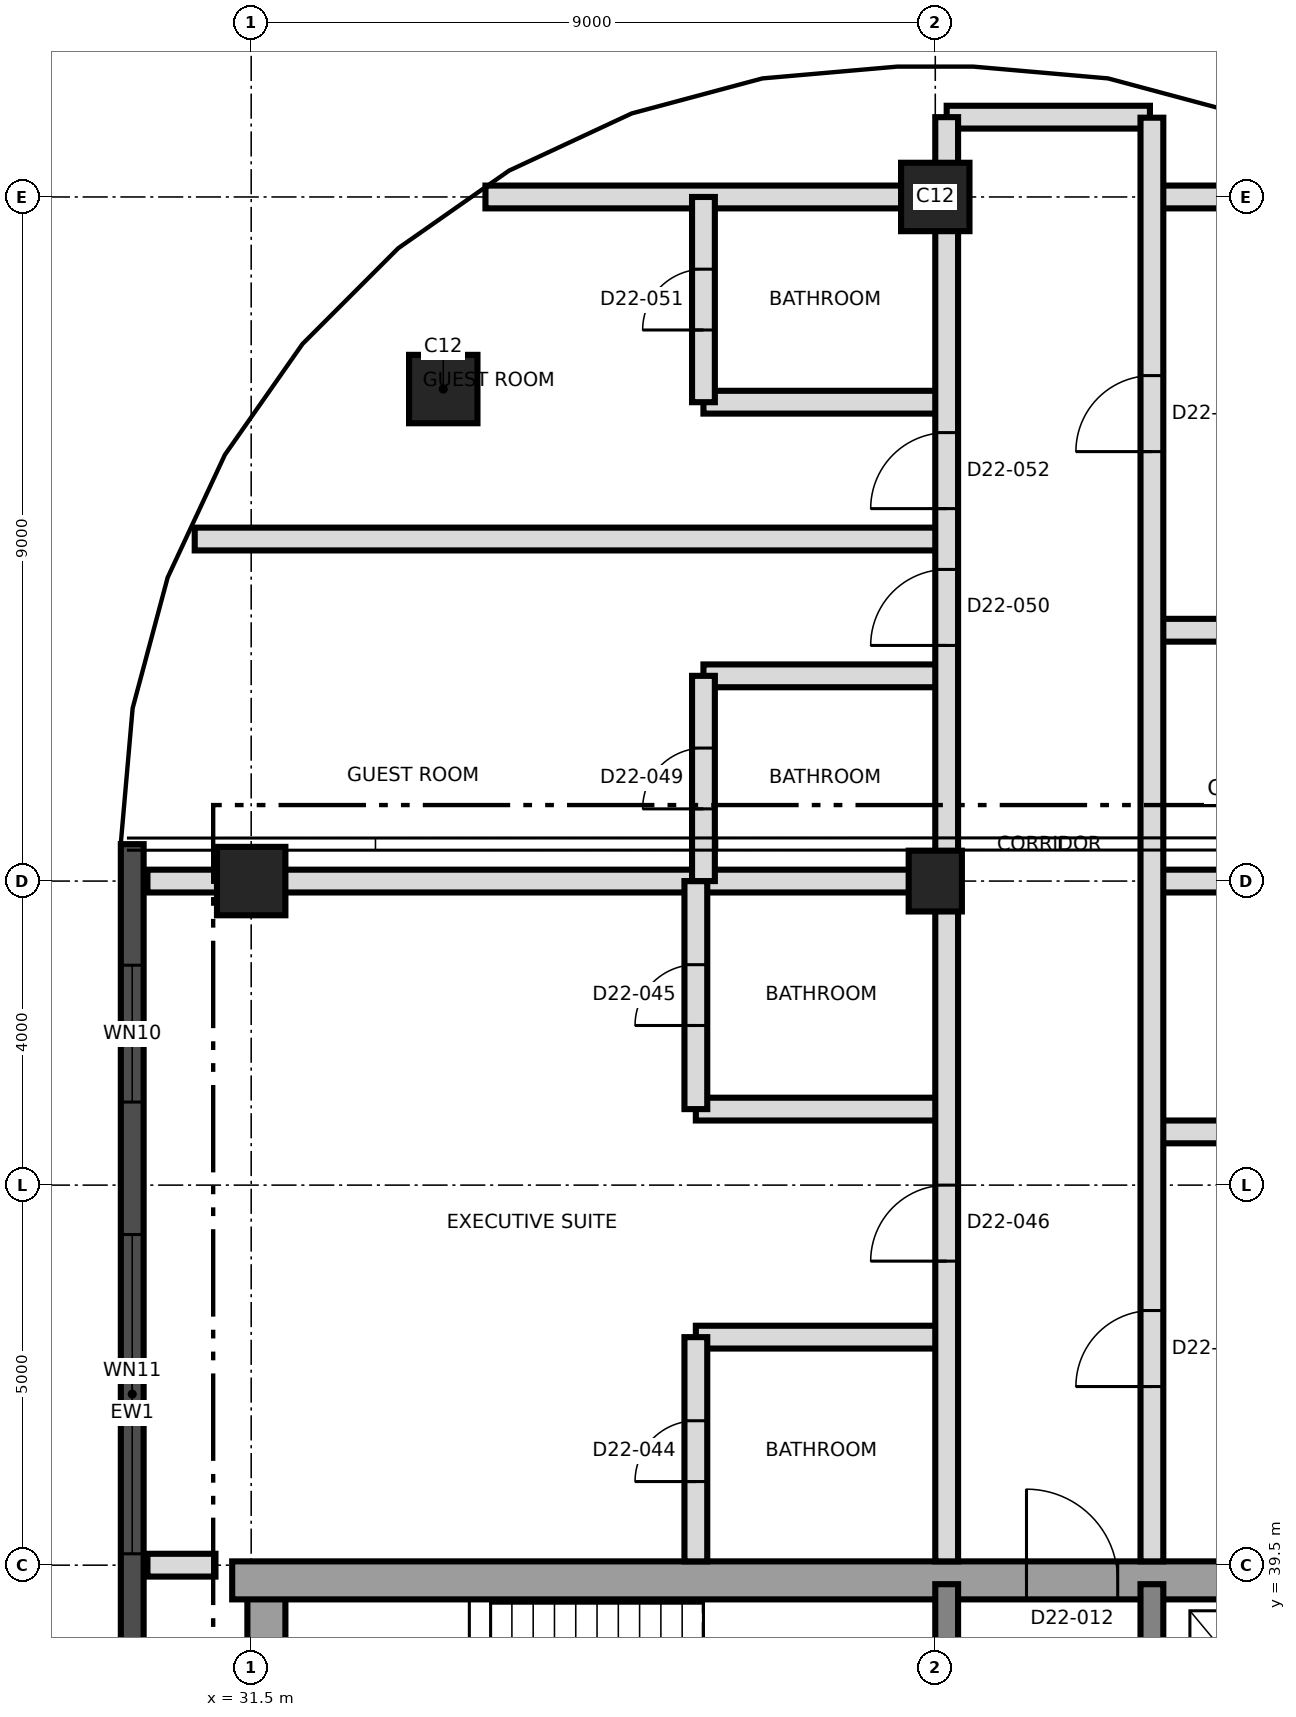
"""IFC4 building model, lengths in metres.
Left out: names, types, materials, properties, quantities, classifications, styles, units other than length and angle.
Written with IfcOpenShell. Run it as: python <this file> out.ifc"""

import sys

from ifc_helpers import new_model, si_unit, direction, frame, frame_2d, origin, origin_2d, place, context, subcontext, project, spatial, rectangle, extrude, element, fill, save


model = new_model("IFC4")
c1 = context("Model", 3, precision=1e-05, world=origin(), true_north=direction((0.0, 1.0)))
c2 = subcontext(c1, "Body", "Model", "MODEL_VIEW")
j1 = project(units=[si_unit("LENGTHUNIT", "METRE"), si_unit("PLANEANGLEUNIT", "RADIAN")], contexts=[c1])
p1 = place(None, origin())
s1 = spatial("IfcSite", under=j1, at=p1, CompositionType="ELEMENT")
p2 = place(p1, origin())
s2 = spatial("IfcBuilding", under=s1, at=p2, CompositionType="ELEMENT")
p3 = place(p2, frame((0.0, 0.0, 199.5)))
s3 = spatial("IfcBuildingStorey", under=s2, at=p3, CompositionType="ELEMENT", Elevation=199.5)
p4 = place(p3, frame((31.7, 21.75, 0.0), z_axis=(0.0, 0.0, 1.0), x_axis=(0.0, 1.0, 0.0)))
e1 = element("IfcWall", 1, at=p4, inside=s3, PredefinedType="SHEAR", context=c2, shape_type="SweptSolid", body=[
    extrude(rectangle(XDim=17.5, YDim=0.5, at=frame_2d((8.75, 0.0))), origin(), (0.0, 0.0, 1.0), 3.7),
])
p5 = place(p3, frame((31.25, 39.3, 0.0), z_axis=(0.0, 0.0, 1.0), x_axis=(1.0, 0.0, 0.0)))
e2 = element("IfcWall", 2, at=p5, inside=s3, PredefinedType="SHEAR", context=c2, shape_type="SweptSolid", body=[
    extrude(rectangle(XDim=27.0, YDim=0.5, at=frame_2d((13.5, 0.0))), origin(), (0.0, 0.0, 1.0), 3.7),
])
p6 = place(p5, frame((10.45, 0.0, 0.0)))
e3 = element("IfcOpeningElement", 3, at=p6, cuts=e2, PredefinedType="OPENING", context=c2, shape_type="SweptSolid", body=[
    extrude(rectangle(XDim=1.2, YDim=2.1, at=frame_2d((0.6, 1.05))), frame((0.0, 0.26, 0.0), z_axis=(0.0, -1.0, 0.0), x_axis=(1.0, 0.0, 0.0)), (0.0, 0.0, 1.0), 0.52),
])
for number, where, z_axis, x_axis in (
    (4, (40.65, 33.5, 0.0), (0.0, 0.0, 1.0), (0.0, 1.0, 0.0)),
    (5, (43.35, 33.5, 0.0), (0.0, 0.0, 1.0), (0.0, 1.0, 0.0)),
):
    element("IfcWall", number, at=place(p3, frame(where, z_axis=z_axis, x_axis=x_axis)), inside=s3, PredefinedType="SHEAR", context=c2, shape_type="SweptSolid", body=[
        extrude(rectangle(XDim=5.75, YDim=0.3, at=frame_2d((2.875, 0.0))), origin(), (0.0, 0.0, 1.0), 3.7),
    ])
p7 = place(p3, frame((31.5, 48.5, 0.0), z_axis=(0.0, 0.0, 1.0), x_axis=(1.0, 0.0, 0.0)))
e6 = element("IfcColumn", 6, at=p7, inside=s3, PredefinedType="COLUMN", context=c2, shape_type="SweptSolid", body=[
    extrude(rectangle(XDim=0.9, YDim=0.9, at=origin_2d()), origin(), (0.0, 0.0, 1.0), 3.7),
])
p8 = place(p3, frame((40.5, 48.5, 0.0), z_axis=(0.0, 0.0, 1.0), x_axis=(0.0, 1.0, 0.0)))
e7 = element("IfcColumn", 7, at=p8, inside=s3, PredefinedType="COLUMN", context=c2, shape_type="SweptSolid", body=[
    extrude(rectangle(XDim=0.8, YDim=0.7, at=origin_2d()), origin(), (0.0, 0.0, 1.0), 3.7),
])
for number, where, z_axis, x_axis in (
    (8, (34.027, 54.973, 0.0), (0.0, 0.0, 1.0), (1.0, 0.0, 0.0)),
    (9, (40.5, 57.5, 0.0), (0.0, 0.0, 1.0), (1.0, 0.0, 0.0)),
):
    element("IfcColumn", number, at=place(p3, frame(where, z_axis=z_axis, x_axis=x_axis)), inside=s3, PredefinedType="COLUMN", context=c2, shape_type="SweptSolid", body=[
        extrude(rectangle(XDim=0.9, YDim=0.9, at=origin_2d()), origin(), (0.0, 0.0, 1.0), 3.7),
    ])
p9 = place(p3, frame((29.935, 48.986, 0.0), z_axis=(0.0, 0.0, 1.0), x_axis=(0.0, -1.0, 0.0)))
e10 = element("IfcWall", 10, at=p9, inside=s3, PredefinedType="SOLIDWALL", context=c2, shape_type="SweptSolid", body=[
    extrude(rectangle(XDim=14.976, YDim=0.3, at=frame_2d((7.488, 0.0))), origin(), (0.0, 0.0, 1.0), 3.4),
])
p10 = place(p9, frame((1.593, 0.0, 0.3)))
e11 = element("IfcOpeningElement", 11, at=p10, cuts=e10, PredefinedType="OPENING", context=c2, shape_type="SweptSolid", body=[
    extrude(rectangle(XDim=1.8, YDim=2.4, at=frame_2d((0.9, 1.2))), frame((0.0, 0.16, 0.0), z_axis=(0.0, -1.0, 0.0), x_axis=(1.0, 0.0, 0.0)), (0.0, 0.0, 1.0), 0.32),
])
p11 = place(p9, frame((5.136, 0.0, 0.9)))
e12 = element("IfcOpeningElement", 12, at=p11, cuts=e10, PredefinedType="OPENING", context=c2, shape_type="SweptSolid", body=[
    extrude(rectangle(XDim=4.2, YDim=1.5, at=frame_2d((2.1, 0.75))), frame((0.0, 0.16, 0.0), z_axis=(0.0, -1.0, 0.0), x_axis=(1.0, 0.0, 0.0)), (0.0, 0.0, 1.0), 0.32),
])
p12 = place(p9, frame((11.331, 0.0, 0.3)))
e13 = element("IfcOpeningElement", 13, at=p12, cuts=e10, PredefinedType="OPENING", context=c2, shape_type="SweptSolid", body=[
    extrude(rectangle(XDim=1.8, YDim=2.4, at=frame_2d((0.9, 1.2))), frame((0.0, 0.16, 0.0), z_axis=(0.0, -1.0, 0.0), x_axis=(1.0, 0.0, 0.0)), (0.0, 0.0, 1.0), 0.32),
])
p13 = place(p3, frame((30.135, 39.5, 0.0), z_axis=(0.0, 0.0, 1.0), x_axis=(1.0, 0.0, 0.0)))
e14 = element("IfcWall", 14, at=p13, inside=s3, PredefinedType="PARTITIONING", context=c2, shape_type="SweptSolid", body=[
    extrude(rectangle(XDim=0.895, YDim=0.3, at=frame_2d((0.448, 0.0))), origin(), (0.0, 0.0, 1.0), 3.4),
])
p14 = place(p3, frame((37.35, 42.5, 0.0), z_axis=(0.0, 0.0, 1.0), x_axis=(1.0, 0.0, 0.0)))
e15 = element("IfcWall", 15, at=p14, inside=s3, PredefinedType="PARTITIONING", context=c2, shape_type="SweptSolid", body=[
    extrude(rectangle(XDim=3.3, YDim=0.3, at=frame_2d((1.65, 0.0))), origin(), (0.0, 0.0, 1.0), 3.4),
])
p15 = place(p3, frame((43.35, 45.2, 0.0), z_axis=(0.0, 0.0, 1.0), x_axis=(1.0, 0.0, 0.0)))
e16 = element("IfcWall", 16, at=p15, inside=s3, PredefinedType="PARTITIONING", context=c2, shape_type="SweptSolid", body=[
    extrude(rectangle(XDim=3.5, YDim=0.3, at=frame_2d((1.75, 0.0))), origin(), (0.0, 0.0, 1.0), 3.4),
])
p16 = place(p3, frame((37.35, 45.5, 0.0), z_axis=(0.0, 0.0, 1.0), x_axis=(1.0, 0.0, 0.0)))
e17 = element("IfcWall", 17, at=p16, inside=s3, PredefinedType="PARTITIONING", context=c2, shape_type="SweptSolid", body=[
    extrude(rectangle(XDim=3.3, YDim=0.3, at=frame_2d((1.65, 0.0))), origin(), (0.0, 0.0, 1.0), 3.4),
])
p17 = place(p3, frame((30.135, 48.5, 0.0), z_axis=(0.0, 0.0, 1.0), x_axis=(1.0, 0.0, 0.0)))
e18 = element("IfcWall", 18, at=p17, inside=s3, PredefinedType="PARTITIONING", context=c2, shape_type="SweptSolid", body=[
    extrude(rectangle(XDim=10.515, YDim=0.3, at=frame_2d((5.257, 0.0))), origin(), (0.0, 0.0, 1.0), 3.4),
])
p18 = place(p3, frame((43.35, 48.5, 0.0), z_axis=(0.0, 0.0, 1.0), x_axis=(1.0, 0.0, 0.0)))
e19 = element("IfcWall", 19, at=p18, inside=s3, PredefinedType="PARTITIONING", context=c2, shape_type="SweptSolid", body=[
    extrude(rectangle(XDim=7.695, YDim=0.3, at=frame_2d((3.847, 0.0))), origin(), (0.0, 0.0, 1.0), 3.4),
])
p19 = place(p3, frame((37.45, 51.2, 0.0), z_axis=(0.0, 0.0, 1.0), x_axis=(1.0, 0.0, 0.0)))
e20 = element("IfcWall", 20, at=p19, inside=s3, PredefinedType="PARTITIONING", context=c2, shape_type="SweptSolid", body=[
    extrude(rectangle(XDim=3.2, YDim=0.3, at=frame_2d((1.6, 0.0))), origin(), (0.0, 0.0, 1.0), 3.4),
])
p20 = place(p3, frame((43.35, 51.8, 0.0), z_axis=(0.0, 0.0, 1.0), x_axis=(1.0, 0.0, 0.0)))
e21 = element("IfcWall", 21, at=p20, inside=s3, PredefinedType="PARTITIONING", context=c2, shape_type="SweptSolid", body=[
    extrude(rectangle(XDim=3.5, YDim=0.3, at=frame_2d((1.75, 0.0))), origin(), (0.0, 0.0, 1.0), 3.4),
])
p21 = place(p3, frame((30.757, 53.0, 0.0), z_axis=(0.0, 0.0, 1.0), x_axis=(1.0, 0.0, 0.0)))
e22 = element("IfcWall", 22, at=p21, inside=s3, PredefinedType="PARTITIONING", context=c2, shape_type="SweptSolid", body=[
    extrude(rectangle(XDim=9.893, YDim=0.3, at=frame_2d((4.946, 0.0))), origin(), (0.0, 0.0, 1.0), 3.4),
])
p22 = place(p3, frame((37.45, 54.8, 0.0), z_axis=(0.0, 0.0, 1.0), x_axis=(1.0, 0.0, 0.0)))
e23 = element("IfcWall", 23, at=p22, inside=s3, PredefinedType="PARTITIONING", context=c2, shape_type="SweptSolid", body=[
    extrude(rectangle(XDim=3.2, YDim=0.3, at=frame_2d((1.6, 0.0))), origin(), (0.0, 0.0, 1.0), 3.4),
])
p23 = place(p3, frame((34.582, 57.5, 0.0), z_axis=(0.0, 0.0, 1.0), x_axis=(1.0, 0.0, 0.0)))
e24 = element("IfcWall", 24, at=p23, inside=s3, PredefinedType="PARTITIONING", context=c2, shape_type="SweptSolid", body=[
    extrude(rectangle(XDim=6.068, YDim=0.3, at=frame_2d((3.034, 0.0))), origin(), (0.0, 0.0, 1.0), 3.4),
])
p24 = place(p3, frame((43.35, 57.5, 0.0), z_axis=(0.0, 0.0, 1.0), x_axis=(1.0, 0.0, 0.0)))
e25 = element("IfcWall", 25, at=p24, inside=s3, PredefinedType="PARTITIONING", context=c2, shape_type="SweptSolid", body=[
    extrude(rectangle(XDim=3.068, YDim=0.3, at=frame_2d((1.534, 0.0))), origin(), (0.0, 0.0, 1.0), 3.4),
])
p25 = place(p3, frame((40.65, 58.55, 0.0), z_axis=(0.0, 0.0, 1.0), x_axis=(1.0, 0.0, 0.0)))
e26 = element("IfcWall", 26, at=p25, inside=s3, PredefinedType="PARTITIONING", context=c2, shape_type="SweptSolid", body=[
    extrude(rectangle(XDim=2.674, YDim=0.3, at=frame_2d((1.337, 0.0))), origin(), (0.0, 0.0, 1.0), 3.4),
])
p26 = place(p3, frame((37.35, 39.55, 0.0), z_axis=(0.0, 0.0, 1.0), x_axis=(0.0, 1.0, 0.0)))
e27 = element("IfcWall", 27, at=p26, inside=s3, PredefinedType="PARTITIONING", context=c2, shape_type="SweptSolid", body=[
    extrude(rectangle(XDim=2.95, YDim=0.3, at=frame_2d((1.475, 0.0))), origin(), (0.0, 0.0, 1.0), 3.4),
])
p27 = place(p26, frame((1.05, 0.0, 0.0)))
e28 = element("IfcOpeningElement", 28, at=p27, cuts=e27, PredefinedType="OPENING", context=c2, shape_type="SweptSolid", body=[
    extrude(rectangle(XDim=0.8, YDim=2.1, at=frame_2d((0.4, 1.05))), frame((0.0, 0.16, 0.0), z_axis=(0.0, -1.0, 0.0), x_axis=(1.0, 0.0, 0.0)), (0.0, 0.0, 1.0), 0.32),
])
p28 = place(p3, frame((37.35, 45.5, 0.0), z_axis=(0.0, 0.0, 1.0), x_axis=(0.0, 1.0, 0.0)))
e29 = element("IfcWall", 29, at=p28, inside=s3, PredefinedType="PARTITIONING", context=c2, shape_type="SweptSolid", body=[
    extrude(rectangle(XDim=3.0, YDim=0.3, at=frame_2d((1.5, 0.0))), origin(), (0.0, 0.0, 1.0), 3.4),
])
p29 = place(p28, frame((1.1, 0.0, 0.0)))
e30 = element("IfcOpeningElement", 30, at=p29, cuts=e29, PredefinedType="OPENING", context=c2, shape_type="SweptSolid", body=[
    extrude(rectangle(XDim=0.8, YDim=2.1, at=frame_2d((0.4, 1.05))), frame((0.0, 0.16, 0.0), z_axis=(0.0, -1.0, 0.0), x_axis=(1.0, 0.0, 0.0)), (0.0, 0.0, 1.0), 0.32),
])
p30 = place(p3, frame((37.45, 48.5, 0.0), z_axis=(0.0, 0.0, 1.0), x_axis=(0.0, 1.0, 0.0)))
e31 = element("IfcWall", 31, at=p30, inside=s3, PredefinedType="PARTITIONING", context=c2, shape_type="SweptSolid", body=[
    extrude(rectangle(XDim=2.7, YDim=0.3, at=frame_2d((1.35, 0.0))), origin(), (0.0, 0.0, 1.0), 3.4),
])
p31 = place(p30, frame((0.95, 0.0, 0.0)))
e32 = element("IfcOpeningElement", 32, at=p31, cuts=e31, PredefinedType="OPENING", context=c2, shape_type="SweptSolid", body=[
    extrude(rectangle(XDim=0.8, YDim=2.1, at=frame_2d((0.4, 1.05))), frame((0.0, 0.16, 0.0), z_axis=(0.0, -1.0, 0.0), x_axis=(1.0, 0.0, 0.0)), (0.0, 0.0, 1.0), 0.32),
])
p32 = place(p3, frame((37.45, 54.8, 0.0), z_axis=(0.0, 0.0, 1.0), x_axis=(0.0, 1.0, 0.0)))
e33 = element("IfcWall", 33, at=p32, inside=s3, PredefinedType="PARTITIONING", context=c2, shape_type="SweptSolid", body=[
    extrude(rectangle(XDim=2.7, YDim=0.3, at=frame_2d((1.35, 0.0))), origin(), (0.0, 0.0, 1.0), 3.4),
])
p33 = place(p32, frame((0.95, 0.0, 0.0)))
e34 = element("IfcOpeningElement", 34, at=p33, cuts=e33, PredefinedType="OPENING", context=c2, shape_type="SweptSolid", body=[
    extrude(rectangle(XDim=0.8, YDim=2.1, at=frame_2d((0.4, 1.05))), frame((0.0, 0.16, 0.0), z_axis=(0.0, -1.0, 0.0), x_axis=(1.0, 0.0, 0.0)), (0.0, 0.0, 1.0), 0.32),
])
p34 = place(p3, frame((40.65, 39.55, 0.0), z_axis=(0.0, 0.0, 1.0), x_axis=(0.0, 1.0, 0.0)))
e35 = element("IfcWall", 35, at=p34, inside=s3, PredefinedType="PARTITIONING", context=c2, shape_type="SweptSolid", body=[
    extrude(rectangle(XDim=19.0, YDim=0.3, at=frame_2d((9.5, 0.0))), origin(), (0.0, 0.0, 1.0), 3.4),
])
p35 = place(p34, frame((3.95, 0.0, 0.0)))
e36 = element("IfcOpeningElement", 36, at=p35, cuts=e35, PredefinedType="OPENING", context=c2, shape_type="SweptSolid", body=[
    extrude(rectangle(XDim=1.0, YDim=2.4, at=frame_2d((0.5, 1.2))), frame((0.0, 0.16, 0.0), z_axis=(0.0, -1.0, 0.0), x_axis=(1.0, 0.0, 0.0)), (0.0, 0.0, 1.0), 0.32),
])
p36 = place(p34, frame((12.05, 0.0, 0.0)))
e37 = element("IfcOpeningElement", 37, at=p36, cuts=e35, PredefinedType="OPENING", context=c2, shape_type="SweptSolid", body=[
    extrude(rectangle(XDim=1.0, YDim=2.1, at=frame_2d((0.5, 1.05))), frame((0.0, 0.16, 0.0), z_axis=(0.0, -1.0, 0.0), x_axis=(1.0, 0.0, 0.0)), (0.0, 0.0, 1.0), 0.32),
])
p37 = place(p34, frame((13.85, 0.0, 0.0)))
e38 = element("IfcOpeningElement", 38, at=p37, cuts=e35, PredefinedType="OPENING", context=c2, shape_type="SweptSolid", body=[
    extrude(rectangle(XDim=1.0, YDim=2.1, at=frame_2d((0.5, 1.05))), frame((0.0, 0.16, 0.0), z_axis=(0.0, -1.0, 0.0), x_axis=(1.0, 0.0, 0.0)), (0.0, 0.0, 1.0), 0.32),
])
p38 = place(p3, frame((43.35, 39.55, 0.0), z_axis=(0.0, 0.0, 1.0), x_axis=(0.0, 1.0, 0.0)))
e39 = element("IfcWall", 39, at=p38, inside=s3, PredefinedType="PARTITIONING", context=c2, shape_type="SweptSolid", body=[
    extrude(rectangle(XDim=18.993, YDim=0.3, at=frame_2d((9.497, 0.0))), origin(), (0.0, 0.0, 1.0), 3.4),
])
p39 = place(p38, frame((2.3, 0.0, 0.0)))
e40 = element("IfcOpeningElement", 40, at=p39, cuts=e39, PredefinedType="OPENING", context=c2, shape_type="SweptSolid", body=[
    extrude(rectangle(XDim=1.0, YDim=2.4, at=frame_2d((0.5, 1.2))), frame((0.0, 0.16, 0.0), z_axis=(0.0, -1.0, 0.0), x_axis=(1.0, 0.0, 0.0)), (0.0, 0.0, 1.0), 0.32),
])
p40 = place(p38, frame((14.6, 0.0, 0.0)))
e41 = element("IfcOpeningElement", 41, at=p40, cuts=e39, PredefinedType="OPENING", context=c2, shape_type="SweptSolid", body=[
    extrude(rectangle(XDim=1.0, YDim=2.4, at=frame_2d((0.5, 1.2))), frame((0.0, 0.16, 0.0), z_axis=(0.0, -1.0, 0.0), x_axis=(1.0, 0.0, 0.0)), (0.0, 0.0, 1.0), 0.32),
])
p41 = place(p10, origin())
e42 = element("IfcWindow", 42, at=p41, inside=s3, PartitioningType="SINGLE_PANEL", PredefinedType="WINDOW", context=c2, shape_type="SweptSolid", body=[
    extrude(rectangle(XDim=1.8, YDim=2.4, at=frame_2d((0.9, 1.2))), frame((0.0, 0.03, 0.0), z_axis=(0.0, -1.0, 0.0), x_axis=(1.0, 0.0, 0.0)), (0.0, 0.0, 1.0), 0.06),
])
fill(e11, e42)
p42 = place(p11, origin())
e43 = element("IfcWindow", 43, at=p42, inside=s3, PartitioningType="SINGLE_PANEL", PredefinedType="WINDOW", context=c2, shape_type="SweptSolid", body=[
    extrude(rectangle(XDim=4.2, YDim=1.5, at=frame_2d((2.1, 0.75))), frame((0.0, 0.03, 0.0), z_axis=(0.0, -1.0, 0.0), x_axis=(1.0, 0.0, 0.0)), (0.0, 0.0, 1.0), 0.06),
])
fill(e12, e43)
p43 = place(p6, origin())
e44 = element("IfcDoor", 44, at=p43, inside=s3, OperationType="SINGLE_SWING_RIGHT", PredefinedType="DOOR", context=c2, shape_type="SweptSolid", body=[
    extrude(rectangle(XDim=1.2, YDim=2.1, at=frame_2d((0.6, 1.05))), frame((0.0, 0.025, 0.0), z_axis=(0.0, -1.0, 0.0), x_axis=(1.0, 0.0, 0.0)), (0.0, 0.0, 1.0), 0.05),
])
fill(e3, e44)
p44 = place(p39, origin())
e45 = element("IfcDoor", 45, at=p44, inside=s3, OperationType="SINGLE_SWING_LEFT", PredefinedType="DOOR", context=c2, shape_type="SweptSolid", body=[
    extrude(rectangle(XDim=1.0, YDim=2.4, at=frame_2d((0.5, 1.2))), frame((0.0, 0.025, 0.0), z_axis=(0.0, -1.0, 0.0), x_axis=(1.0, 0.0, 0.0)), (0.0, 0.0, 1.0), 0.05),
])
fill(e40, e45)
p45 = place(p27, origin())
e46 = element("IfcDoor", 46, at=p45, inside=s3, OperationType="SINGLE_SWING_LEFT", PredefinedType="DOOR", context=c2, shape_type="SweptSolid", body=[
    extrude(rectangle(XDim=0.8, YDim=2.1, at=frame_2d((0.4, 1.05))), frame((0.0, 0.025, 0.0), z_axis=(0.0, -1.0, 0.0), x_axis=(1.0, 0.0, 0.0)), (0.0, 0.0, 1.0), 0.05),
])
fill(e28, e46)
p46 = place(p29, origin())
e47 = element("IfcDoor", 47, at=p46, inside=s3, OperationType="SINGLE_SWING_RIGHT", PredefinedType="DOOR", context=c2, shape_type="SweptSolid", body=[
    extrude(rectangle(XDim=0.8, YDim=2.1, at=frame_2d((0.4, 1.05))), frame((0.0, 0.025, 0.0), z_axis=(0.0, -1.0, 0.0), x_axis=(1.0, 0.0, 0.0)), (0.0, 0.0, 1.0), 0.05),
])
fill(e30, e47)
p47 = place(p35, origin())
e48 = element("IfcDoor", 48, at=p47, inside=s3, OperationType="SINGLE_SWING_LEFT", PredefinedType="DOOR", context=c2, shape_type="SweptSolid", body=[
    extrude(rectangle(XDim=1.0, YDim=2.4, at=frame_2d((0.5, 1.2))), frame((0.0, 0.025, 0.0), z_axis=(0.0, -1.0, 0.0), x_axis=(1.0, 0.0, 0.0)), (0.0, 0.0, 1.0), 0.05),
])
fill(e36, e48)
p48 = place(p40, origin())
e49 = element("IfcDoor", 49, at=p48, inside=s3, OperationType="SINGLE_SWING_LEFT", PredefinedType="DOOR", context=c2, shape_type="SweptSolid", body=[
    extrude(rectangle(XDim=1.0, YDim=2.4, at=frame_2d((0.5, 1.2))), frame((0.0, 0.025, 0.0), z_axis=(0.0, -1.0, 0.0), x_axis=(1.0, 0.0, 0.0)), (0.0, 0.0, 1.0), 0.05),
])
fill(e41, e49)
p49 = place(p31, origin())
e50 = element("IfcDoor", 50, at=p49, inside=s3, OperationType="SINGLE_SWING_LEFT", PredefinedType="DOOR", context=c2, shape_type="SweptSolid", body=[
    extrude(rectangle(XDim=0.8, YDim=2.1, at=frame_2d((0.4, 1.05))), frame((0.0, 0.025, 0.0), z_axis=(0.0, -1.0, 0.0), x_axis=(1.0, 0.0, 0.0)), (0.0, 0.0, 1.0), 0.05),
])
fill(e32, e50)
p50 = place(p36, origin())
e51 = element("IfcDoor", 51, at=p50, inside=s3, OperationType="SINGLE_SWING_RIGHT", PredefinedType="DOOR", context=c2, shape_type="SweptSolid", body=[
    extrude(rectangle(XDim=1.0, YDim=2.1, at=frame_2d((0.5, 1.05))), frame((0.0, 0.025, 0.0), z_axis=(0.0, -1.0, 0.0), x_axis=(1.0, 0.0, 0.0)), (0.0, 0.0, 1.0), 0.05),
])
fill(e37, e51)
p51 = place(p33, origin())
e52 = element("IfcDoor", 52, at=p51, inside=s3, OperationType="SINGLE_SWING_RIGHT", PredefinedType="DOOR", context=c2, shape_type="SweptSolid", body=[
    extrude(rectangle(XDim=0.8, YDim=2.1, at=frame_2d((0.4, 1.05))), frame((0.0, 0.025, 0.0), z_axis=(0.0, -1.0, 0.0), x_axis=(1.0, 0.0, 0.0)), (0.0, 0.0, 1.0), 0.05),
])
fill(e34, e52)
p52 = place(p37, origin())
e53 = element("IfcDoor", 53, at=p52, inside=s3, OperationType="SINGLE_SWING_LEFT", PredefinedType="DOOR", context=c2, shape_type="SweptSolid", body=[
    extrude(rectangle(XDim=1.0, YDim=2.1, at=frame_2d((0.5, 1.05))), frame((0.0, 0.025, 0.0), z_axis=(0.0, -1.0, 0.0), x_axis=(1.0, 0.0, 0.0)), (0.0, 0.0, 1.0), 0.05),
])
fill(e38, e53)
save(model, sys.argv[1])
